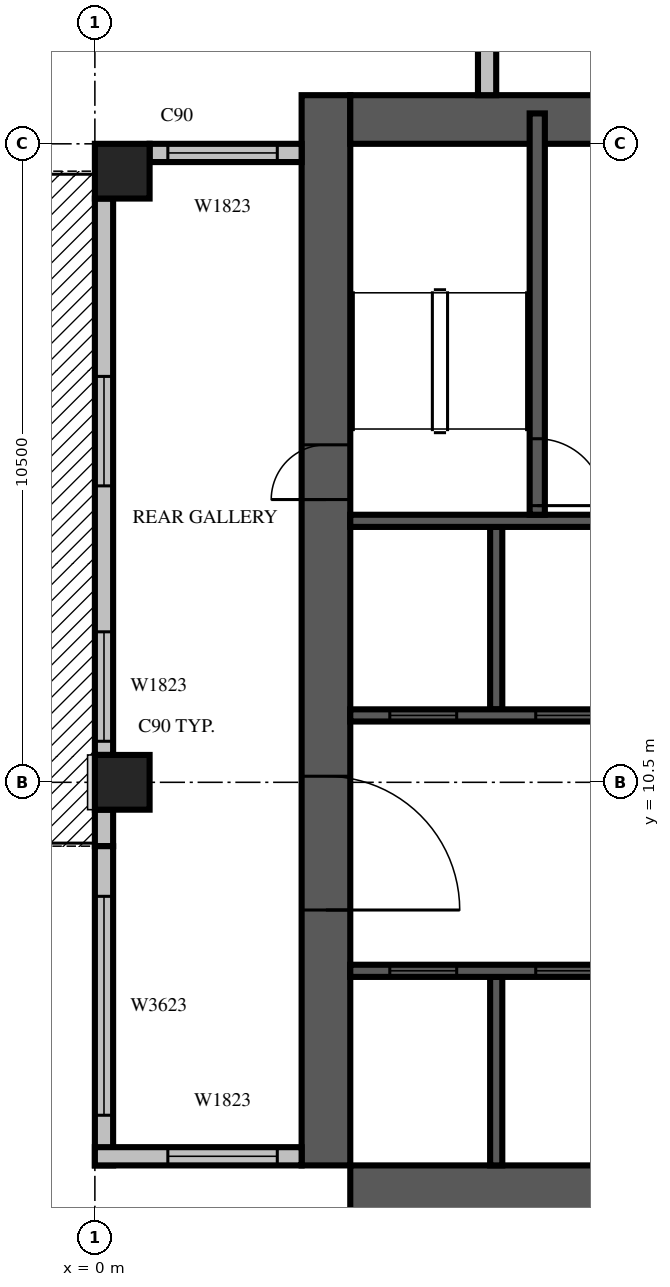
"""IFC4 building model, lengths in metres.
Left out: names, types, materials, properties, quantities, classifications, styles, units other than length and angle.
Written with IfcOpenShell. Run it as: python <this file> out.ifc"""

import sys

from ifc_helpers import new_model, si_unit, direction, frame, frame_2d, origin, origin_2d, place, context, subcontext, project, spatial, rectangle, extrude, source, transform, mapped, element, fill, save


model = new_model("IFC4")
c1 = context("Model", 3, precision=1e-05, world=origin(), true_north=direction((0.0, 1.0)))
c2 = subcontext(c1, "Body", "Model", "MODEL_VIEW")
j1 = project(units=[si_unit("LENGTHUNIT", "METRE"), si_unit("PLANEANGLEUNIT", "RADIAN")], contexts=[c1])
p1 = place(None, origin())
s1 = spatial("IfcSite", under=j1, at=p1, CompositionType="ELEMENT")
p2 = place(p1, origin())
s2 = spatial("IfcBuilding", under=s1, at=p2, CompositionType="ELEMENT")
p3 = place(p2, frame((0.0, 0.0, 215.8)))
s3 = spatial("IfcBuildingStorey", under=s2, at=p3, CompositionType="ELEMENT", Elevation=215.8)
m1 = source(origin(), c2, "Body", "SweptSolid", [
    extrude(rectangle(XDim=0.9, YDim=0.9, at=origin_2d()), origin(), (0.0, 0.0, 1.0), 3.8),
])
for number, where, z_axis, x_axis in (
    (1, (0.45, 10.5, 0.0), (0.0, 0.0, 1.0), (1.0, 0.0, 0.0)),
    (2, (0.45, 20.55, 0.0), (0.0, 0.0, 1.0), (1.0, 0.0, 0.0)),
):
    element("IfcColumn", number, at=place(p3, frame(where, z_axis=z_axis, x_axis=x_axis)), inside=s3, PredefinedType="COLUMN", context=c2, shape_type="MappedRepresentation", body=[
        mapped(m1, transform((0.0, 0.0, 0.0), scale=1.0)),
    ])
m2 = source(origin(), c2, "Body", "SweptSolid", [
    extrude(rectangle(XDim=17.6, YDim=0.8, at=frame_2d((8.8, 0.0))), origin(), (0.0, 0.0, 1.0), 3.8),
])
p4 = place(p3, frame((3.8, 4.2, 0.0), z_axis=(0.0, 0.0, 1.0), x_axis=(0.0, 1.0, 0.0)))
e3 = element("IfcWall", 3, at=p4, inside=s3, PredefinedType="SHEAR", context=c2, shape_type="MappedRepresentation", body=[
    mapped(m2, transform((0.0, 0.0, 0.0), scale=1.0)),
])
m3 = source(origin(), c2, "Body", "SweptSolid", [
    extrude(rectangle(XDim=2.2, YDim=2.1, at=frame_2d((1.1, 1.05))), frame((0.0, 0.41, 0.0), z_axis=(0.0, -1.0, 0.0), x_axis=(1.0, 0.0, 0.0)), (0.0, 0.0, 1.0), 0.82),
])
p5 = place(p4, frame((4.2, 0.0, 0.0)))
e4 = element("IfcOpeningElement", 4, at=p5, cuts=e3, PredefinedType="OPENING", context=c2, shape_type="MappedRepresentation", body=[
    mapped(m3, transform((0.0, 0.0, 0.0), scale=1.0)),
])
m4 = source(origin(), c2, "Body", "SweptSolid", [
    extrude(rectangle(XDim=0.9, YDim=2.1, at=frame_2d((0.45, 1.05))), frame((0.0, 0.41, 0.0), z_axis=(0.0, -1.0, 0.0), x_axis=(1.0, 0.0, 0.0)), (0.0, 0.0, 1.0), 0.82),
])
p6 = place(p4, frame((10.95, 0.0, 0.0)))
e5 = element("IfcOpeningElement", 5, at=p6, cuts=e3, PredefinedType="OPENING", context=c2, shape_type="MappedRepresentation", body=[
    mapped(m4, transform((0.0, 0.0, 0.0), scale=1.0)),
])
p7 = place(p3, frame((4.2, 3.8, 0.0), z_axis=(0.0, 0.0, 1.0), x_axis=(1.0, 0.0, 0.0)))
e6 = element("IfcWall", 6, at=p7, inside=s3, PredefinedType="SHEAR", context=c2, shape_type="MappedRepresentation", body=[
    mapped(m2, transform((0.0, 0.0, 0.0), scale=1.0)),
])
p8 = place(p7, frame((12.75, 0.0, 0.0)))
e7 = element("IfcOpeningElement", 7, at=p8, cuts=e6, PredefinedType="OPENING", context=c2, shape_type="MappedRepresentation", body=[
    mapped(m4, transform((0.0, 0.0, 0.0), scale=1.0)),
])
m5 = source(origin(), c2, "Body", "SweptSolid", [
    extrude(rectangle(XDim=16.8, YDim=0.8, at=frame_2d((8.4, 0.0))), origin(), (0.0, 0.0, 1.0), 3.8),
])
p9 = place(p3, frame((4.2, 21.4, 0.0), z_axis=(0.0, 0.0, 1.0), x_axis=(1.0, 0.0, 0.0)))
e8 = element("IfcWall", 8, at=p9, inside=s3, PredefinedType="SHEAR", context=c2, shape_type="MappedRepresentation", body=[
    mapped(m5, transform((0.0, 0.0, 0.0), scale=1.0)),
])
m6 = source(origin(), c2, "Body", "SweptSolid", [
    extrude(rectangle(XDim=1.2, YDim=2.1, at=frame_2d((0.6, 1.05))), frame((0.0, 0.41, 0.0), z_axis=(0.0, -1.0, 0.0), x_axis=(1.0, 0.0, 0.0)), (0.0, 0.0, 1.0), 0.82),
])
p10 = place(p9, frame((6.2, 0.0, 0.0)))
e9 = element("IfcOpeningElement", 9, at=p10, cuts=e8, PredefinedType="OPENING", context=c2, shape_type="MappedRepresentation", body=[
    mapped(m6, transform((0.0, 0.0, 0.0), scale=1.0)),
])
m7 = source(origin(), c2, "Body", "SweptSolid", [
    extrude(rectangle(XDim=16.6, YDim=0.3, at=frame_2d((8.3, 0.0))), origin(), (0.0, 0.0, 1.0), 2.9),
])
p11 = place(p3, frame((6.45, 38.4, 0.0), z_axis=(0.0, 0.0, 1.0), x_axis=(0.0, -1.0, 0.0)))
e10 = element("IfcWall", 10, at=p11, inside=s3, PredefinedType="STANDARD", context=c2, shape_type="MappedRepresentation", body=[
    mapped(m7, transform((0.0, 0.0, 0.0), scale=1.0)),
])
m8 = source(origin(), c2, "Body", "SweptSolid", [
    extrude(rectangle(XDim=1.8, YDim=2.3, at=frame_2d((0.9, 1.15))), frame((0.0, 0.16, 0.0), z_axis=(0.0, -1.0, 0.0), x_axis=(1.0, 0.0, 0.0)), (0.0, 0.0, 1.0), 0.32),
])
p12 = place(p11, frame((1.15, 0.0, 0.6)))
e11 = element("IfcOpeningElement", 11, at=p12, cuts=e10, PredefinedType="OPENING", context=c2, shape_type="MappedRepresentation", body=[
    mapped(m8, transform((0.0, 0.0, 0.0), scale=1.0)),
])
p13 = place(p11, frame((5.162, 0.0, 0.6)))
e12 = element("IfcOpeningElement", 12, at=p13, cuts=e10, PredefinedType="OPENING", context=c2, shape_type="MappedRepresentation", body=[
    mapped(m8, transform((0.0, 0.0, 0.0), scale=1.0)),
])
p14 = place(p11, frame((9.438, 0.0, 0.6)))
e13 = element("IfcOpeningElement", 13, at=p14, cuts=e10, PredefinedType="OPENING", context=c2, shape_type="MappedRepresentation", body=[
    mapped(m8, transform((0.0, 0.0, 0.0), scale=1.0)),
])
m9 = source(origin(), c2, "Body", "SweptSolid", [
    extrude(rectangle(XDim=1.2, YDim=2.3, at=frame_2d((0.6, 1.15))), frame((0.0, 0.16, 0.0), z_axis=(0.0, -1.0, 0.0), x_axis=(1.0, 0.0, 0.0)), (0.0, 0.0, 1.0), 0.32),
])
p15 = place(p11, frame((14.338, 0.0, 0.6)))
e14 = element("IfcOpeningElement", 14, at=p15, cuts=e10, PredefinedType="OPENING", context=c2, shape_type="MappedRepresentation", body=[
    mapped(m9, transform((0.0, 0.0, 0.0), scale=1.0)),
])
p16 = place(p11, frame((11.887, 0.0, 0.6)))
e15 = element("IfcOpeningElement", 15, at=p16, cuts=e10, PredefinedType="OPENING", context=c2, shape_type="MappedRepresentation", body=[
    mapped(m8, transform((0.0, 0.0, 0.0), scale=1.0)),
])
m10 = source(origin(), c2, "Body", "SweptSolid", [
    extrude(rectangle(XDim=2.5, YDim=0.3, at=frame_2d((1.25, 0.0))), origin(), (0.0, 0.0, 1.0), 3.4),
])
p17 = place(p3, frame((3.4, 20.85, 0.0), z_axis=(0.0, 0.0, 1.0), x_axis=(-1.0, 0.0, 0.0)))
e16 = element("IfcWall", 16, at=p17, inside=s3, PredefinedType="STANDARD", context=c2, shape_type="MappedRepresentation", body=[
    mapped(m10, transform((0.0, 0.0, 0.0), scale=1.0)),
])
p18 = place(p17, frame((0.4, 0.0, 0.6)))
e17 = element("IfcOpeningElement", 17, at=p18, cuts=e16, PredefinedType="OPENING", context=c2, shape_type="MappedRepresentation", body=[
    mapped(m8, transform((0.0, 0.0, 0.0), scale=1.0)),
])
m11 = source(origin(), c2, "Body", "SweptSolid", [
    extrude(rectangle(XDim=9.15, YDim=0.3, at=frame_2d((4.575, 0.0))), origin(), (0.0, 0.0, 1.0), 3.4),
])
p19 = place(p3, frame((0.15, 20.1, 0.0), z_axis=(0.0, 0.0, 1.0), x_axis=(0.0, -1.0, 0.0)))
e18 = element("IfcWall", 18, at=p19, inside=s3, PredefinedType="STANDARD", context=c2, shape_type="MappedRepresentation", body=[
    mapped(m11, transform((0.0, 0.0, 0.0), scale=1.0)),
])
m12 = source(origin(), c2, "Body", "SweptSolid", [
    extrude(rectangle(XDim=1.8, YDim=2.4, at=frame_2d((0.9, 1.2))), frame((0.0, 0.16, 0.0), z_axis=(0.0, -1.0, 0.0), x_axis=(1.0, 0.0, 0.0)), (0.0, 0.0, 1.0), 0.32),
])
p20 = place(p19, frame((2.925, 0.0, 0.0)))
e19 = element("IfcOpeningElement", 19, at=p20, cuts=e18, PredefinedType="OPENING", context=c2, shape_type="MappedRepresentation", body=[
    mapped(m12, transform((0.0, 0.0, 0.0), scale=1.0)),
])
p21 = place(p19, frame((7.125, 0.0, 0.6)))
e20 = element("IfcOpeningElement", 20, at=p21, cuts=e18, PredefinedType="OPENING", context=c2, shape_type="MappedRepresentation", body=[
    mapped(m8, transform((0.0, 0.0, 0.0), scale=1.0)),
])
m13 = source(origin(), c2, "Body", "SweptSolid", [
    extrude(rectangle(XDim=0.6, YDim=0.3, at=frame_2d((0.3, 0.0))), origin(), (0.0, 0.0, 1.0), 3.4),
])
p22 = place(p3, frame((0.15, 10.05, 0.0), z_axis=(0.0, 0.0, 1.0), x_axis=(0.0, -1.0, 0.0)))
e21 = element("IfcWall", 21, at=p22, inside=s3, PredefinedType="STANDARD", context=c2, shape_type="MappedRepresentation", body=[
    mapped(m13, transform((0.0, 0.0, 0.0), scale=1.0)),
])
m14 = source(origin(), c2, "Body", "SweptSolid", [
    extrude(rectangle(XDim=5.25, YDim=0.3, at=frame_2d((2.625, 0.0))), origin(), (0.0, 0.0, 1.0), 3.4),
])
p23 = place(p3, frame((0.15, 9.45, 0.0), z_axis=(0.0, 0.0, 1.0), x_axis=(0.0, -1.0, 0.0)))
e22 = element("IfcWall", 22, at=p23, inside=s3, PredefinedType="STANDARD", context=c2, shape_type="MappedRepresentation", body=[
    mapped(m14, transform((0.0, 0.0, 0.0), scale=1.0)),
])
m15 = source(origin(), c2, "Body", "SweptSolid", [
    extrude(rectangle(XDim=3.6, YDim=2.3, at=frame_2d((1.8, 1.15))), frame((0.0, 0.16, 0.0), z_axis=(0.0, -1.0, 0.0), x_axis=(1.0, 0.0, 0.0)), (0.0, 0.0, 1.0), 0.32),
])
p24 = place(p23, frame((0.825, 0.0, 0.6)))
e23 = element("IfcOpeningElement", 23, at=p24, cuts=e22, PredefinedType="OPENING", context=c2, shape_type="MappedRepresentation", body=[
    mapped(m15, transform((0.0, 0.0, 0.0), scale=1.0)),
])
m16 = source(origin(), c2, "Body", "SweptSolid", [
    extrude(rectangle(XDim=3.4, YDim=0.3, at=frame_2d((1.7, 0.0))), origin(), (0.0, 0.0, 1.0), 3.4),
])
p25 = place(p3, frame((0.0, 4.35, 0.0), z_axis=(0.0, 0.0, 1.0), x_axis=(1.0, 0.0, 0.0)))
e24 = element("IfcWall", 24, at=p25, inside=s3, PredefinedType="STANDARD", context=c2, shape_type="MappedRepresentation", body=[
    mapped(m16, transform((0.0, 0.0, 0.0), scale=1.0)),
])
p26 = place(p25, frame((1.2, 0.0, 0.6)))
e25 = element("IfcOpeningElement", 25, at=p26, cuts=e24, PredefinedType="OPENING", context=c2, shape_type="MappedRepresentation", body=[
    mapped(m8, transform((0.0, 0.0, 0.0), scale=1.0)),
])
m17 = source(origin(), c2, "Body", "SweptSolid", [
    extrude(rectangle(XDim=3.1, YDim=0.2, at=frame_2d((1.55, 0.0))), origin(), (0.0, 0.0, 1.0), 3.8),
])
p27 = place(p3, frame((6.6, 4.2, 0.0), z_axis=(0.0, 0.0, 1.0), x_axis=(0.0, 1.0, 0.0)))
e26 = element("IfcWall", 26, at=p27, inside=s3, PredefinedType="SOLIDWALL", context=c2, shape_type="MappedRepresentation", body=[
    mapped(m17, transform((0.0, 0.0, 0.0), scale=1.0)),
])
m18 = source(origin(), c2, "Body", "SweptSolid", [
    extrude(rectangle(XDim=3.0, YDim=0.2, at=frame_2d((1.5, 0.0))), origin(), (0.0, 0.0, 1.0), 3.8),
])
p28 = place(p3, frame((6.6, 11.7, 0.0), z_axis=(0.0, 0.0, 1.0), x_axis=(0.0, 1.0, 0.0)))
e27 = element("IfcWall", 27, at=p28, inside=s3, PredefinedType="SOLIDWALL", context=c2, shape_type="MappedRepresentation", body=[
    mapped(m18, transform((0.0, 0.0, 0.0), scale=1.0)),
])
m19 = source(origin(), c2, "Body", "SweptSolid", [
    extrude(rectangle(XDim=9.6, YDim=0.2, at=frame_2d((4.8, 0.0))), origin(), (0.0, 0.0, 1.0), 3.8),
])
p29 = place(p3, frame((4.2, 7.4, 0.0), z_axis=(0.0, 0.0, 1.0), x_axis=(1.0, 0.0, 0.0)))
e28 = element("IfcWall", 28, at=p29, inside=s3, PredefinedType="SOLIDWALL", context=c2, shape_type="MappedRepresentation", body=[
    mapped(m19, transform((0.0, 0.0, 0.0), scale=1.0)),
])
m20 = source(origin(), c2, "Body", "SweptSolid", [
    extrude(rectangle(XDim=1.1, YDim=2.1, at=frame_2d((0.55, 1.05))), frame((0.0, 0.11, 0.0), z_axis=(0.0, -1.0, 0.0), x_axis=(1.0, 0.0, 0.0)), (0.0, 0.0, 1.0), 0.22),
])
p30 = place(p29, frame((0.65, 0.0, 0.0)))
e29 = element("IfcOpeningElement", 29, at=p30, cuts=e28, PredefinedType="OPENING", context=c2, shape_type="MappedRepresentation", body=[
    mapped(m20, transform((0.0, 0.0, 0.0), scale=1.0)),
])
p31 = place(p29, frame((3.05, 0.0, 0.0)))
e30 = element("IfcOpeningElement", 30, at=p31, cuts=e28, PredefinedType="OPENING", context=c2, shape_type="MappedRepresentation", body=[
    mapped(m20, transform((0.0, 0.0, 0.0), scale=1.0)),
])
p32 = place(p29, frame((5.45, 0.0, 0.0)))
e31 = element("IfcOpeningElement", 31, at=p32, cuts=e28, PredefinedType="OPENING", context=c2, shape_type="MappedRepresentation", body=[
    mapped(m20, transform((0.0, 0.0, 0.0), scale=1.0)),
])
p33 = place(p29, frame((7.85, 0.0, 0.0)))
e32 = element("IfcOpeningElement", 32, at=p33, cuts=e28, PredefinedType="OPENING", context=c2, shape_type="MappedRepresentation", body=[
    mapped(m20, transform((0.0, 0.0, 0.0), scale=1.0)),
])
m21 = source(origin(), c2, "Body", "SweptSolid", [
    extrude(rectangle(XDim=4.8, YDim=0.2, at=frame_2d((2.4, 0.0))), origin(), (0.0, 0.0, 1.0), 3.8),
])
p34 = place(p3, frame((4.2, 11.6, 0.0), z_axis=(0.0, 0.0, 1.0), x_axis=(1.0, 0.0, 0.0)))
e33 = element("IfcWall", 33, at=p34, inside=s3, PredefinedType="SOLIDWALL", context=c2, shape_type="MappedRepresentation", body=[
    mapped(m21, transform((0.0, 0.0, 0.0), scale=1.0)),
])
p35 = place(p34, frame((0.65, 0.0, 0.0)))
e34 = element("IfcOpeningElement", 34, at=p35, cuts=e33, PredefinedType="OPENING", context=c2, shape_type="MappedRepresentation", body=[
    mapped(m20, transform((0.0, 0.0, 0.0), scale=1.0)),
])
p36 = place(p34, frame((3.05, 0.0, 0.0)))
e35 = element("IfcOpeningElement", 35, at=p36, cuts=e33, PredefinedType="OPENING", context=c2, shape_type="MappedRepresentation", body=[
    mapped(m20, transform((0.0, 0.0, 0.0), scale=1.0)),
])
p37 = place(p3, frame((4.2, 14.8, 0.0), z_axis=(0.0, 0.0, 1.0), x_axis=(1.0, 0.0, 0.0)))
e36 = element("IfcWall", 36, at=p37, inside=s3, PredefinedType="SOLIDWALL", context=c2, shape_type="MappedRepresentation", body=[
    mapped(m21, transform((0.0, 0.0, 0.0), scale=1.0)),
])
m22 = source(origin(), c2, "Body", "SweptSolid", [
    extrude(rectangle(XDim=6.6, YDim=0.25, at=frame_2d((3.3, 0.0))), origin(), (0.0, 0.0, 1.0), 3.4),
])
p38 = place(p3, frame((7.275, 14.9, 0.0), z_axis=(0.0, 0.0, 1.0), x_axis=(0.0, 1.0, 0.0)))
e37 = element("IfcWall", 37, at=p38, inside=s3, PredefinedType="SOLIDWALL", context=c2, shape_type="MappedRepresentation", body=[
    mapped(m22, transform((0.0, 0.0, 0.0), scale=1.0)),
])
m23 = source(origin(), c2, "Body", "SweptSolid", [
    extrude(rectangle(XDim=1.1, YDim=2.1, at=frame_2d((0.55, 1.05))), frame((0.0, 0.135, 0.0), z_axis=(0.0, -1.0, 0.0), x_axis=(1.0, 0.0, 0.0)), (0.0, 0.0, 1.0), 0.27),
])
p39 = place(p38, frame((0.15, 0.0, 0.0)))
e38 = element("IfcOpeningElement", 38, at=p39, cuts=e37, PredefinedType="OPENING", context=c2, shape_type="MappedRepresentation", body=[
    mapped(m23, transform((0.0, 0.0, 0.0), scale=1.0)),
])
m24 = source(origin(), c2, "Body", "SweptSolid", [
    extrude(rectangle(XDim=1.8, YDim=2.3, at=frame_2d((0.9, 1.15))), frame((0.0, 0.03, 0.0), z_axis=(0.0, -1.0, 0.0), x_axis=(1.0, 0.0, 0.0)), (0.0, 0.0, 1.0), 0.06),
])
p40 = place(p18, origin())
e39 = element("IfcWindow", 39, at=p40, inside=s3, PartitioningType="SINGLE_PANEL", PredefinedType="WINDOW", context=c2, shape_type="MappedRepresentation", body=[
    mapped(m24, transform((0.0, 0.0, 0.0), scale=1.0)),
])
fill(e17, e39)
m25 = source(origin(), c2, "Body", "SweptSolid", [
    extrude(rectangle(XDim=1.8, YDim=2.4, at=frame_2d((0.9, 1.2))), frame((0.0, 0.025, 0.0), z_axis=(0.0, -1.0, 0.0), x_axis=(1.0, 0.0, 0.0)), (0.0, 0.0, 1.0), 0.05),
])
p41 = place(p20, origin())
e40 = element("IfcDoor", 40, at=p41, inside=s3, OperationType="SLIDING_TO_LEFT", PredefinedType="DOOR", context=c2, shape_type="MappedRepresentation", body=[
    mapped(m25, transform((0.0, 0.0, 0.0), scale=1.0)),
])
fill(e19, e40)
p42 = place(p21, origin())
e41 = element("IfcWindow", 41, at=p42, inside=s3, PartitioningType="SINGLE_PANEL", PredefinedType="WINDOW", context=c2, shape_type="MappedRepresentation", body=[
    mapped(m24, transform((0.0, 0.0, 0.0), scale=1.0)),
])
fill(e20, e41)
m26 = source(origin(), c2, "Body", "SweptSolid", [
    extrude(rectangle(XDim=3.6, YDim=2.3, at=frame_2d((1.8, 1.15))), frame((0.0, 0.03, 0.0), z_axis=(0.0, -1.0, 0.0), x_axis=(1.0, 0.0, 0.0)), (0.0, 0.0, 1.0), 0.06),
])
p43 = place(p24, origin())
e42 = element("IfcWindow", 42, at=p43, inside=s3, PartitioningType="SINGLE_PANEL", PredefinedType="WINDOW", context=c2, shape_type="MappedRepresentation", body=[
    mapped(m26, transform((0.0, 0.0, 0.0), scale=1.0)),
])
fill(e23, e42)
p44 = place(p26, origin())
e43 = element("IfcWindow", 43, at=p44, inside=s3, PartitioningType="SINGLE_PANEL", PredefinedType="WINDOW", context=c2, shape_type="MappedRepresentation", body=[
    mapped(m24, transform((0.0, 0.0, 0.0), scale=1.0)),
])
fill(e25, e43)
m27 = source(origin(), c2, "Body", "SweptSolid", [
    extrude(rectangle(XDim=1.1, YDim=2.1, at=frame_2d((0.55, 1.05))), frame((0.0, 0.025, 0.0), z_axis=(0.0, -1.0, 0.0), x_axis=(1.0, 0.0, 0.0)), (0.0, 0.0, 1.0), 0.05),
])
p45 = place(p30, origin())
e44 = element("IfcDoor", 44, at=p45, inside=s3, OperationType="SLIDING_TO_LEFT", PredefinedType="DOOR", context=c2, shape_type="MappedRepresentation", body=[
    mapped(m27, transform((0.0, 0.0, 0.0), scale=1.0)),
])
fill(e29, e44)
p46 = place(p31, origin())
e45 = element("IfcDoor", 45, at=p46, inside=s3, OperationType="SLIDING_TO_LEFT", PredefinedType="DOOR", context=c2, shape_type="MappedRepresentation", body=[
    mapped(m27, transform((0.0, 0.0, 0.0), scale=1.0)),
])
fill(e30, e45)
p47 = place(p35, origin())
e46 = element("IfcDoor", 46, at=p47, inside=s3, OperationType="SLIDING_TO_LEFT", PredefinedType="DOOR", context=c2, shape_type="MappedRepresentation", body=[
    mapped(m27, transform((0.0, 0.0, 0.0), scale=1.0)),
])
fill(e34, e46)
p48 = place(p36, origin())
e47 = element("IfcDoor", 47, at=p48, inside=s3, OperationType="SLIDING_TO_LEFT", PredefinedType="DOOR", context=c2, shape_type="MappedRepresentation", body=[
    mapped(m27, transform((0.0, 0.0, 0.0), scale=1.0)),
])
fill(e35, e47)
p49 = place(p39, origin())
e48 = element("IfcDoor", 48, at=p49, inside=s3, OperationType="SINGLE_SWING_RIGHT", PredefinedType="DOOR", context=c2, shape_type="MappedRepresentation", body=[
    mapped(m27, transform((0.0, 0.0, 0.0), scale=1.0)),
])
fill(e38, e48)
m28 = source(origin(), c2, "Body", "SweptSolid", [
    extrude(rectangle(XDim=2.2, YDim=2.1, at=frame_2d((1.1, 1.05))), frame((0.0, 0.025, 0.0), z_axis=(0.0, -1.0, 0.0), x_axis=(1.0, 0.0, 0.0)), (0.0, 0.0, 1.0), 0.05),
])
p50 = place(p5, origin())
e49 = element("IfcDoor", 49, at=p50, inside=s3, OperationType="DOUBLE_DOOR_SINGLE_SWING", PredefinedType="DOOR", context=c2, shape_type="MappedRepresentation", body=[
    mapped(m28, transform((0.0, 0.0, 0.0), scale=1.0)),
])
fill(e4, e49)
m29 = source(origin(), c2, "Body", "SweptSolid", [
    extrude(rectangle(XDim=0.9, YDim=2.1, at=frame_2d((0.45, 1.05))), frame((0.0, 0.025, 0.0), z_axis=(0.0, -1.0, 0.0), x_axis=(1.0, 0.0, 0.0)), (0.0, 0.0, 1.0), 0.05),
])
p51 = place(p6, origin())
e50 = element("IfcDoor", 50, at=p51, inside=s3, OperationType="SINGLE_SWING_LEFT", PredefinedType="DOOR", context=c2, shape_type="MappedRepresentation", body=[
    mapped(m29, transform((0.0, 0.0, 0.0), scale=1.0)),
])
fill(e5, e50)
save(model, sys.argv[1])
